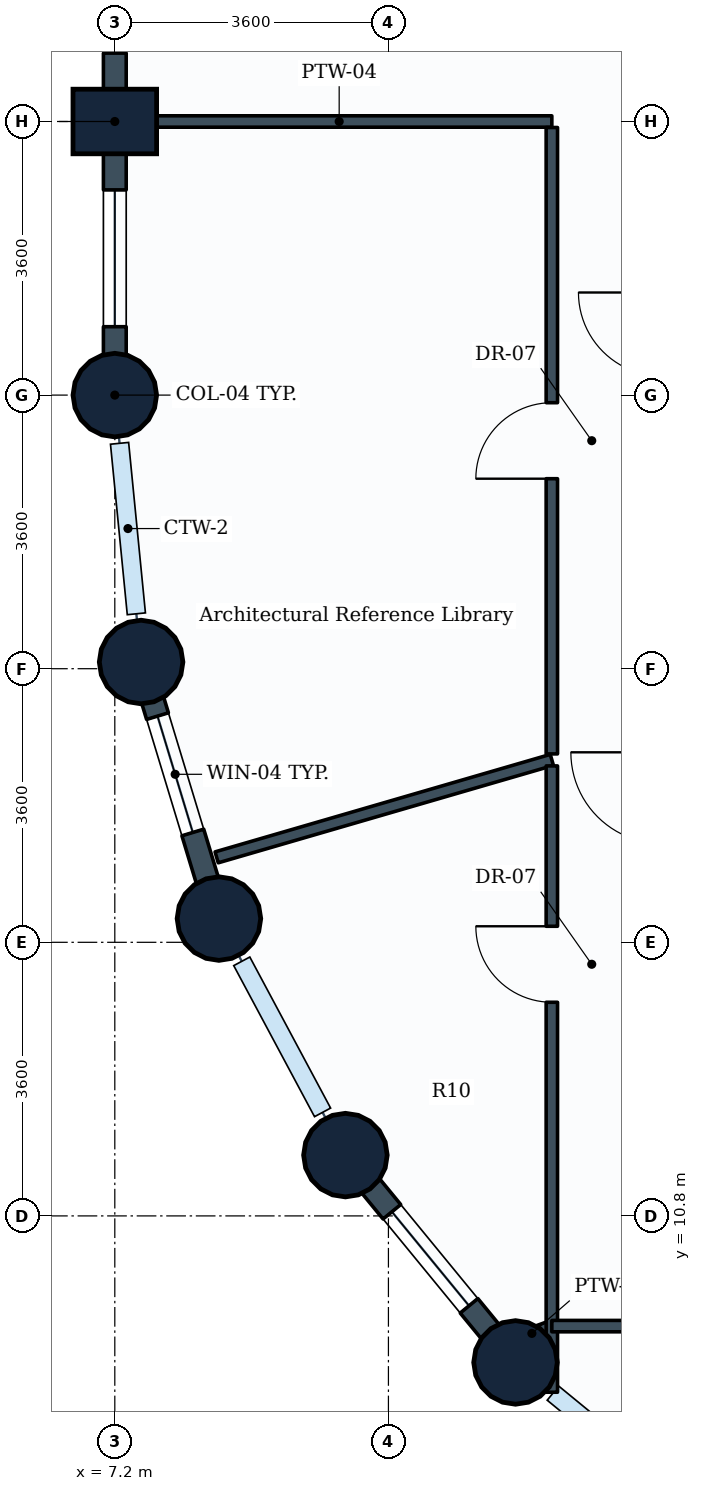
"""IFC4 building model, lengths in metres.
Left out: names, types, materials, properties, quantities, classifications, styles, units other than length and angle.
Written with IfcOpenShell. Run it as: python <this file> out.ifc"""

import sys

from ifc_helpers import new_model, si_unit, direction, frame, frame_2d, origin, origin_2d, place, context, subcontext, project, spatial, rectangle, circle, extrude, element, fill, save


model = new_model("IFC4")
c1 = context("Model", 3, precision=1e-05, world=origin(), true_north=direction((0.0, 1.0)))
c2 = subcontext(c1, "Body", "Model", "MODEL_VIEW")
j1 = project(units=[si_unit("LENGTHUNIT", "METRE"), si_unit("PLANEANGLEUNIT", "RADIAN")], contexts=[c1])
p1 = place(None, origin())
s1 = spatial("IfcSite", under=j1, at=p1, CompositionType="ELEMENT")
p2 = place(p1, origin())
s2 = spatial("IfcBuilding", under=s1, at=p2, CompositionType="ELEMENT")
p3 = place(p2, frame((0.0, 0.0, 87.9)))
s3 = spatial("IfcBuildingStorey", under=s2, at=p3, CompositionType="ELEMENT", Elevation=87.9)
p4 = place(p3, frame((7.2, 21.6, 0.0), z_axis=(0.0, 0.0, 1.0), x_axis=(1.0, 0.0, 0.0)))
e1 = element("IfcColumn", 1, at=p4, inside=s3, PredefinedType="COLUMN", context=c2, shape_type="SweptSolid", body=[
    extrude(circle(Radius=0.55, at=origin_2d()), origin(), (0.0, 0.0, 1.0), 3.9),
])
p5 = place(p3, frame((7.2, 25.2, 0.0), z_axis=(0.0, 0.0, 1.0), x_axis=(0.0, 1.0, 0.0)))
e2 = element("IfcColumn", 2, at=p5, inside=s3, PredefinedType="COLUMN", context=c2, shape_type="SweptSolid", body=[
    extrude(rectangle(XDim=0.85, YDim=1.1, at=origin_2d()), origin(), (0.0, 0.0, 1.0), 3.9),
])
for number, where, z_axis, x_axis in (
    (3, (7.546, 18.088, 0.0), (0.0, 0.0, 1.0), (1.0, 0.0, 0.0)),
    (4, (8.57, 14.712, 0.0), (0.0, 0.0, 1.0), (1.0, 0.0, 0.0)),
    (5, (10.234, 11.6, 0.0), (0.0, 0.0, 1.0), (1.0, 0.0, 0.0)),
    (6, (12.472, 8.872, 0.0), (0.0, 0.0, 1.0), (1.0, 0.0, 0.0)),
):
    element("IfcColumn", number, at=place(p3, frame(where, z_axis=z_axis, x_axis=x_axis)), inside=s3, PredefinedType="COLUMN", context=c2, shape_type="SweptSolid", body=[
        extrude(circle(Radius=0.55, at=origin_2d()), origin(), (0.0, 0.0, 1.0), 3.9),
    ])
p6 = place(p3, frame((7.2, 25.2, 0.0), z_axis=(0.0, 0.0, 1.0), x_axis=(0.0, 1.0, 0.0)))
e7 = element("IfcWall", 7, at=p6, inside=s3, PredefinedType="STANDARD", context=c2, shape_type="SweptSolid", body=[
    extrude(rectangle(XDim=3.6, YDim=0.3, at=frame_2d((1.8, 0.0))), origin(), (0.0, 0.0, 1.0), 2.93),
])
p7 = place(p6, frame((0.9, 0.0, 0.85)))
e8 = element("IfcOpeningElement", 8, at=p7, cuts=e7, PredefinedType="OPENING", context=c2, shape_type="SweptSolid", body=[
    extrude(rectangle(XDim=1.8, YDim=1.35, at=frame_2d((0.9, 0.675))), frame((0.0, 0.16, 0.0), z_axis=(0.0, -1.0, 0.0), x_axis=(1.0, 0.0, 0.0)), (0.0, 0.0, 1.0), 0.32),
])
p8 = place(p3, frame((7.2, 21.6, 0.0), z_axis=(0.0, 0.0, 1.0), x_axis=(0.0, 1.0, 0.0)))
e9 = element("IfcWall", 9, at=p8, inside=s3, PredefinedType="STANDARD", context=c2, shape_type="SweptSolid", body=[
    extrude(rectangle(XDim=3.6, YDim=0.3, at=frame_2d((1.8, 0.0))), origin(), (0.0, 0.0, 1.0), 2.93),
])
p9 = place(p8, frame((0.9, 0.0, 0.85)))
e10 = element("IfcOpeningElement", 10, at=p9, cuts=e9, PredefinedType="OPENING", context=c2, shape_type="SweptSolid", body=[
    extrude(rectangle(XDim=1.8, YDim=1.35, at=frame_2d((0.9, 0.675))), frame((0.0, 0.16, 0.0), z_axis=(0.0, -1.0, 0.0), x_axis=(1.0, 0.0, 0.0)), (0.0, 0.0, 1.0), 0.32),
])
p10 = place(p3, frame((8.57, 14.712, 0.0), z_axis=(0.0, 0.0, 1.0), x_axis=(-0.290305086481, 0.956934144423, 0.0)))
e11 = element("IfcWall", 11, at=p10, inside=s3, PredefinedType="STANDARD", context=c2, shape_type="SweptSolid", body=[
    extrude(rectangle(XDim=3.528, YDim=0.3, at=frame_2d((1.764, 0.0))), origin(), (0.0, 0.0, 1.0), 2.93),
])
p11 = place(p10, frame((1.184, 0.0, 0.85)))
e12 = element("IfcOpeningElement", 12, at=p11, cuts=e11, PredefinedType="OPENING", context=c2, shape_type="SweptSolid", body=[
    extrude(rectangle(XDim=1.6, YDim=1.35, at=frame_2d((0.8, 0.675))), frame((0.0, 0.16, 0.0), z_axis=(0.0, -1.0, 0.0), x_axis=(1.0, 0.0, 0.0)), (0.0, 0.0, 1.0), 0.32),
])
p12 = place(p3, frame((12.472, 8.872, 0.0), z_axis=(0.0, 0.0, 1.0), x_axis=(-0.634258295121, 0.773121216285, 0.0)))
e13 = element("IfcWall", 13, at=p12, inside=s3, PredefinedType="STANDARD", context=c2, shape_type="SweptSolid", body=[
    extrude(rectangle(XDim=3.529, YDim=0.3, at=frame_2d((1.764, 0.0))), origin(), (0.0, 0.0, 1.0), 2.93),
])
p13 = place(p12, frame((0.964, 0.0, 0.85)))
e14 = element("IfcOpeningElement", 14, at=p13, cuts=e13, PredefinedType="OPENING", context=c2, shape_type="SweptSolid", body=[
    extrude(rectangle(XDim=1.6, YDim=1.35, at=frame_2d((0.8, 0.675))), frame((0.0, 0.16, 0.0), z_axis=(0.0, -1.0, 0.0), x_axis=(1.0, 0.0, 0.0)), (0.0, 0.0, 1.0), 0.32),
])
p14 = place(p3, frame((7.354, 25.2, 0.0), z_axis=(0.0, 0.0, 1.0), x_axis=(1.0, 0.0, 0.0)))
e15 = element("IfcWall", 15, at=p14, inside=s3, PredefinedType="PARTITIONING", context=c2, shape_type="SweptSolid", body=[
    extrude(rectangle(XDim=5.596, YDim=0.15, at=frame_2d((2.798, 0.0))), origin(), (0.0, 0.0, 1.0), 3.635),
])
p15 = place(p3, frame((12.95, 16.8, 0.0), z_axis=(0.0, 0.0, 1.0), x_axis=(-0.960237798553, -0.279183398915, 0.0)))
e16 = element("IfcWall", 16, at=p15, inside=s3, PredefinedType="PARTITIONING", context=c2, shape_type="SweptSolid", body=[
    extrude(rectangle(XDim=4.593, YDim=0.15, at=frame_2d((2.296, 0.0))), origin(), (0.0, 0.0, 1.0), 2.93),
])
p16 = place(p3, frame((12.95, 9.35, 0.0), z_axis=(0.0, 0.0, 1.0), x_axis=(-0.939538101119, -0.342444384601, 0.0)))
e17 = element("IfcWall", 17, at=p16, inside=s3, PredefinedType="PARTITIONING", context=c2, shape_type="SweptSolid", body=[
    extrude(rectangle(XDim=0.559, YDim=0.15, at=frame_2d((0.279, 0.0))), origin(), (0.0, 0.0, 1.0), 2.93),
])
p17 = place(p3, frame((12.95, 16.879, 0.0), z_axis=(0.0, 0.0, 1.0), x_axis=(0.0, 1.0, 0.0)))
e18 = element("IfcWall", 18, at=p17, inside=s3, PredefinedType="PARTITIONING", context=c2, shape_type="SweptSolid", body=[
    extrude(rectangle(XDim=8.242, YDim=0.15, at=frame_2d((4.121, 0.0))), origin(), (0.0, 0.0, 1.0), 3.19),
])
p18 = place(p17, frame((3.621, 0.0, 0.0)))
e19 = element("IfcOpeningElement", 19, at=p18, cuts=e18, PredefinedType="OPENING", context=c2, shape_type="SweptSolid", body=[
    extrude(rectangle(XDim=1.0, YDim=2.1, at=frame_2d((0.5, 1.05))), frame((0.0, 0.085, 0.0), z_axis=(0.0, -1.0, 0.0), x_axis=(1.0, 0.0, 0.0)), (0.0, 0.0, 1.0), 0.17),
])
p19 = place(p3, frame((12.95, 8.48, 0.0), z_axis=(0.0, 0.0, 1.0), x_axis=(0.0, 1.0, 0.0)))
e20 = element("IfcWall", 20, at=p19, inside=s3, PredefinedType="PARTITIONING", context=c2, shape_type="SweptSolid", body=[
    extrude(rectangle(XDim=8.241, YDim=0.15, at=frame_2d((4.121, 0.0))), origin(), (0.0, 0.0, 1.0), 2.93),
])
p20 = place(p19, frame((5.131, 0.0, 0.0)))
e21 = element("IfcOpeningElement", 21, at=p20, cuts=e20, PredefinedType="OPENING", context=c2, shape_type="SweptSolid", body=[
    extrude(rectangle(XDim=1.0, YDim=2.1, at=frame_2d((0.5, 1.05))), frame((0.0, 0.085, 0.0), z_axis=(0.0, -1.0, 0.0), x_axis=(1.0, 0.0, 0.0)), (0.0, 0.0, 1.0), 0.17),
])
p21 = place(p3, frame((12.95, 9.35, 0.0), z_axis=(0.0, 0.0, 1.0), x_axis=(1.0, 0.0, 0.0)))
e22 = element("IfcWall", 22, at=p21, inside=s3, PredefinedType="PARTITIONING", context=c2, shape_type="SweptSolid", body=[
    extrude(rectangle(XDim=7.371, YDim=0.15, at=frame_2d((3.686, 0.0))), origin(), (0.0, 0.0, 1.0), 3.19),
])
p22 = place(p21, frame((4.261, 0.0, 0.0)))
e23 = element("IfcOpeningElement", 23, at=p22, cuts=e22, PredefinedType="OPENING", context=c2, shape_type="SweptSolid", body=[
    extrude(rectangle(XDim=1.0, YDim=2.1, at=frame_2d((0.5, 1.05))), frame((0.0, 0.085, 0.0), z_axis=(0.0, -1.0, 0.0), x_axis=(1.0, 0.0, 0.0)), (0.0, 0.0, 1.0), 0.17),
])
p23 = place(p7, origin())
e24 = element("IfcWindow", 24, at=p23, inside=s3, PartitioningType="SINGLE_PANEL", PredefinedType="WINDOW", context=c2, shape_type="SweptSolid", body=[
    extrude(rectangle(XDim=1.8, YDim=1.35, at=frame_2d((0.9, 0.675))), frame((0.0, 0.03, 0.0), z_axis=(0.0, -1.0, 0.0), x_axis=(1.0, 0.0, 0.0)), (0.0, 0.0, 1.0), 0.06),
])
fill(e8, e24)
p24 = place(p9, origin())
e25 = element("IfcWindow", 25, at=p24, inside=s3, PartitioningType="SINGLE_PANEL", PredefinedType="WINDOW", context=c2, shape_type="SweptSolid", body=[
    extrude(rectangle(XDim=1.8, YDim=1.35, at=frame_2d((0.9, 0.675))), frame((0.0, 0.03, 0.0), z_axis=(0.0, -1.0, 0.0), x_axis=(1.0, 0.0, 0.0)), (0.0, 0.0, 1.0), 0.06),
])
fill(e10, e25)
p25 = place(p11, origin())
e26 = element("IfcWindow", 26, at=p25, inside=s3, PartitioningType="SINGLE_PANEL", PredefinedType="WINDOW", context=c2, shape_type="SweptSolid", body=[
    extrude(rectangle(XDim=1.6, YDim=1.35, at=frame_2d((0.8, 0.675))), frame((0.0, 0.03, 0.0), z_axis=(0.0, -1.0, 0.0), x_axis=(1.0, 0.0, 0.0)), (0.0, 0.0, 1.0), 0.06),
])
fill(e12, e26)
p26 = place(p13, origin())
e27 = element("IfcWindow", 27, at=p26, inside=s3, PartitioningType="SINGLE_PANEL", PredefinedType="WINDOW", context=c2, shape_type="SweptSolid", body=[
    extrude(rectangle(XDim=1.6, YDim=1.35, at=frame_2d((0.8, 0.675))), frame((0.0, 0.03, 0.0), z_axis=(0.0, -1.0, 0.0), x_axis=(1.0, 0.0, 0.0)), (0.0, 0.0, 1.0), 0.06),
])
fill(e14, e27)
p27 = place(p18, origin())
e28 = element("IfcDoor", 28, at=p27, inside=s3, OperationType="SINGLE_SWING_LEFT", PredefinedType="DOOR", context=c2, shape_type="SweptSolid", body=[
    extrude(rectangle(XDim=1.0, YDim=2.1, at=frame_2d((0.5, 1.05))), frame((0.0, 0.025, 0.0), z_axis=(0.0, -1.0, 0.0), x_axis=(1.0, 0.0, 0.0)), (0.0, 0.0, 1.0), 0.05),
])
fill(e19, e28)
p28 = place(p20, origin())
e29 = element("IfcDoor", 29, at=p28, inside=s3, OperationType="SINGLE_SWING_RIGHT", PredefinedType="DOOR", context=c2, shape_type="SweptSolid", body=[
    extrude(rectangle(XDim=1.0, YDim=2.1, at=frame_2d((0.5, 1.05))), frame((0.0, 0.025, 0.0), z_axis=(0.0, -1.0, 0.0), x_axis=(1.0, 0.0, 0.0)), (0.0, 0.0, 1.0), 0.05),
])
fill(e21, e29)
save(model, sys.argv[1])
